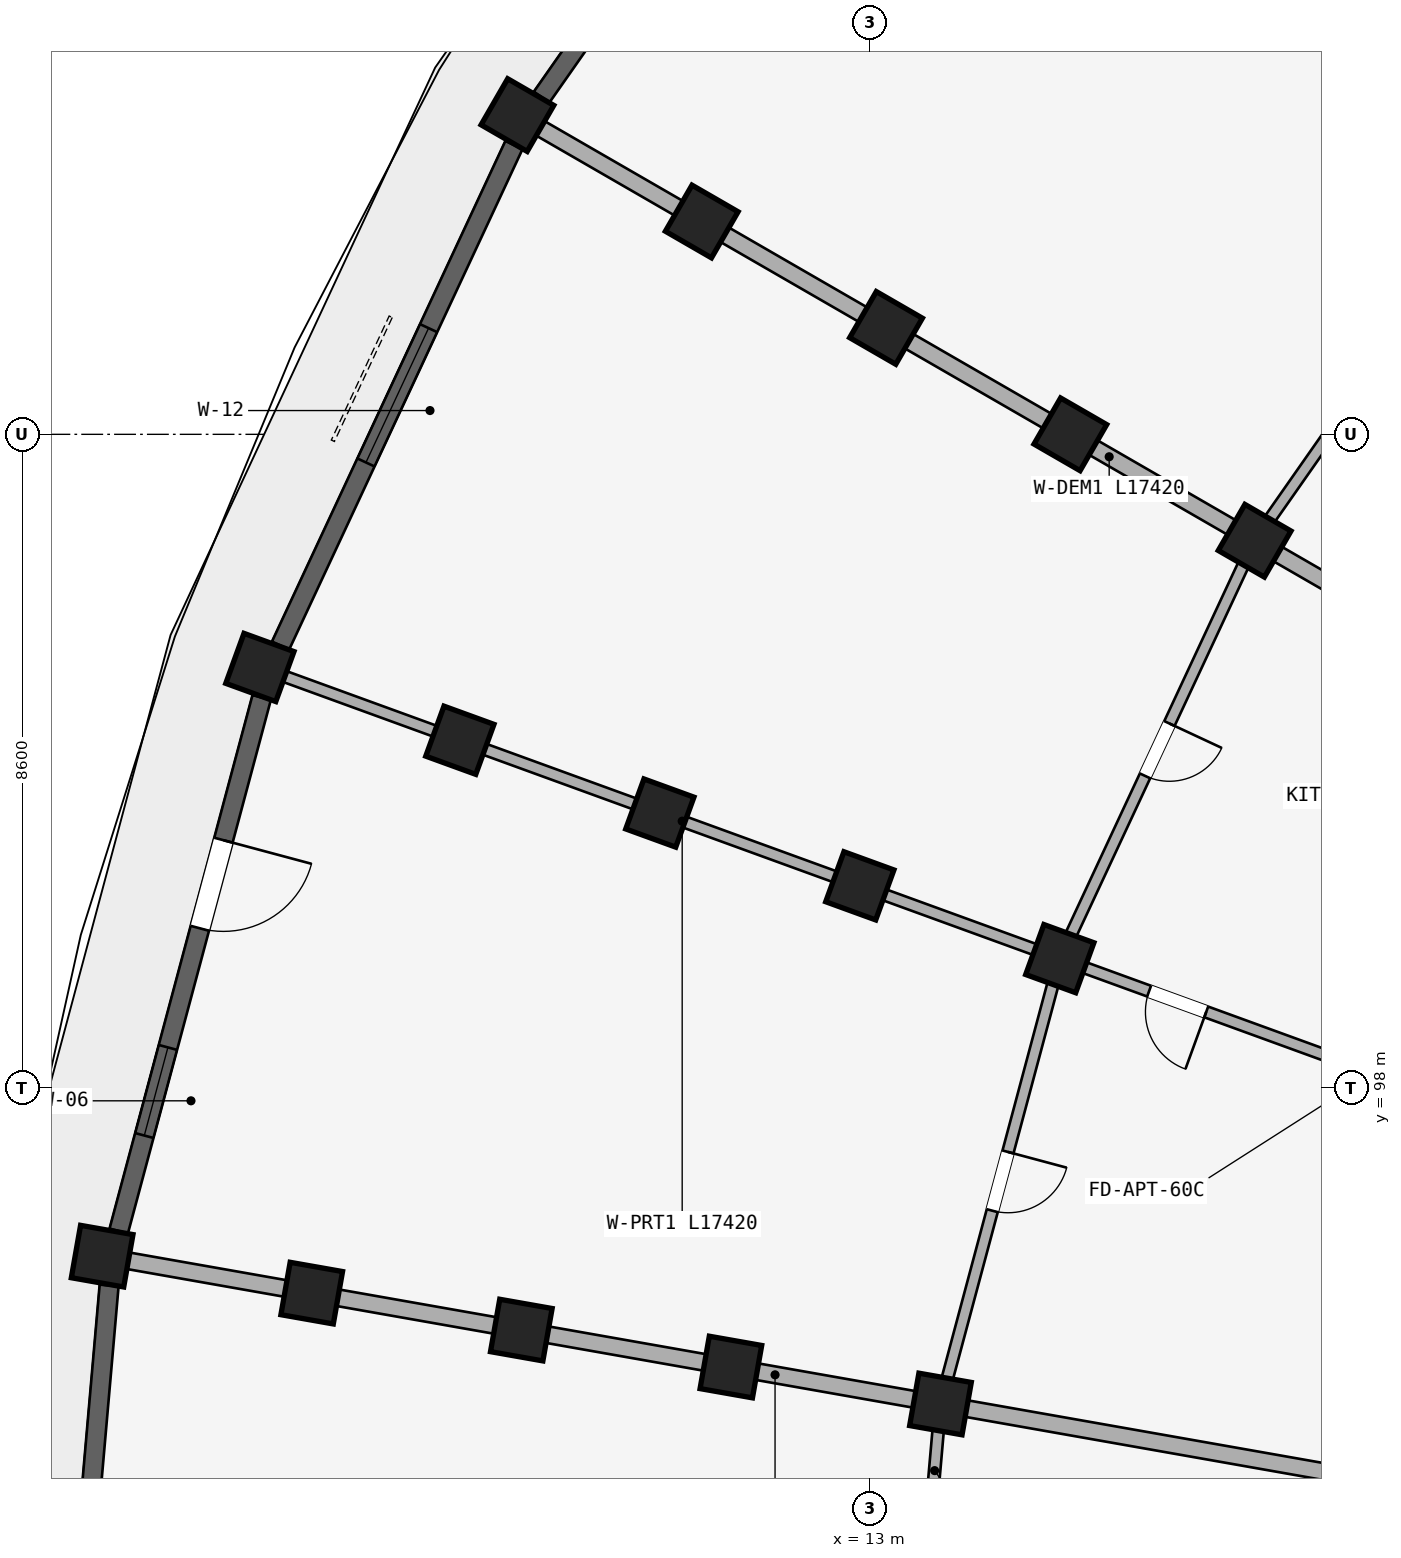
"""IFC4 building model, lengths in metres.
Left out: names, types, materials, properties, quantities, classifications, styles, units other than length and angle.
Written with IfcOpenShell. Run it as: python <this file> out.ifc"""

import sys

from ifc_helpers import new_model, si_unit, direction, frame, frame_2d, origin, origin_2d, place, context, subcontext, project, spatial, rectangle, extrude, element, fill, save


model = new_model("IFC4")
c1 = context("Model", 3, precision=1e-05, world=origin(), true_north=direction((0.0, 1.0)))
c2 = subcontext(c1, "Body", "Model", "MODEL_VIEW")
j1 = project(units=[si_unit("LENGTHUNIT", "METRE"), si_unit("PLANEANGLEUNIT", "RADIAN")], contexts=[c1])
p1 = place(None, origin())
s1 = spatial("IfcSite", under=j1, at=p1, CompositionType="ELEMENT")
p2 = place(p1, origin())
s2 = spatial("IfcBuilding", under=s1, at=p2, CompositionType="ELEMENT")
p3 = place(p2, frame((0.0, 0.0, 18.15)))
s3 = spatial("IfcBuildingStorey", under=s2, at=p3, CompositionType="ELEMENT", Elevation=18.15)
for number, where, z_axis, x_axis in (
    (1, (19.397, 111.969, 0.0), (0.0, 0.0, 1.0), (0.643, 0.766, 0.0)),
    (2, (18.062, 105.2, 0.0), (0.0, 0.0, 1.0), (0.5, 0.866, 0.0)),
    (3, (15.637, 106.6, 0.0), (0.0, 0.0, 1.0), (0.5, 0.866, 0.0)),
    (4, (13.213, 108.0, 0.0), (0.0, 0.0, 1.0), (0.5, 0.866, 0.0)),
    (5, (10.788, 109.4, 0.0), (0.0, 0.0, 1.0), (0.5, 0.866, 0.0)),
    (6, (8.363, 110.8, 0.0), (0.0, 0.0, 1.0), (0.5, 0.866, 0.0)),
    (7, (15.499, 99.702, 0.0), (0.0, 0.0, 1.0), (0.342, 0.94, 0.0)),
    (8, (12.868, 100.66, 0.0), (0.0, 0.0, 1.0), (0.342, 0.94, 0.0)),
    (9, (10.236, 101.618, 0.0), (0.0, 0.0, 1.0), (0.342, 0.94, 0.0)),
    (10, (7.605, 102.575, 0.0), (0.0, 0.0, 1.0), (0.342, 0.94, 0.0)),
    (11, (4.974, 103.533, 0.0), (0.0, 0.0, 1.0), (0.342, 0.94, 0.0)),
    (12, (13.929, 93.843, 0.0), (0.0, 0.0, 1.0), (0.174, 0.985, 0.0)),
    (13, (11.171, 94.329, 0.0), (0.0, 0.0, 1.0), (0.174, 0.985, 0.0)),
    (14, (8.414, 94.815, 0.0), (0.0, 0.0, 1.0), (0.174, 0.985, 0.0)),
    (15, (5.656, 95.302, 0.0), (0.0, 0.0, 1.0), (0.174, 0.985, 0.0)),
    (16, (2.899, 95.788, 0.0), (0.0, 0.0, 1.0), (0.174, 0.985, 0.0)),
):
    element("IfcColumn", number, at=place(p3, frame(where, z_axis=z_axis, x_axis=x_axis)), inside=s3, PredefinedType="COLUMN", context=c2, shape_type="SweptSolid", body=[
        extrude(rectangle(XDim=0.7, YDim=0.7, at=origin_2d()), origin(), (0.0, 0.0, 1.0), 2.93),
    ])
p4 = place(p3, frame((30.009, 109.479, 0.0), z_axis=(0.0, 0.0, 1.0), x_axis=(-0.642784757967, 0.766046835987, 0.0)))
e17 = element("IfcWall", 17, at=p4, inside=s3, PredefinedType="PARTITIONING", context=c2, shape_type="SweptSolid", body=[
    extrude(rectangle(XDim=17.42, YDim=0.15, at=frame_2d((8.71, 0.0))), origin(), (0.0, 0.0, 1.0), 2.372),
])
p5 = place(p4, frame((4.45, 0.0, 0.0)))
e18 = element("IfcOpeningElement", 18, at=p5, cuts=e17, PredefinedType="OPENING", context=c2, shape_type="SweptSolid", body=[
    extrude(rectangle(XDim=0.8, YDim=2.1, at=frame_2d((0.4, 1.05))), frame((0.0, 0.085, 0.0), z_axis=(0.0, -1.0, 0.0), x_axis=(1.0, 0.0, 0.0)), (0.0, 0.0, 1.0), 0.17),
])
p6 = place(p3, frame((26.521, 105.991, 0.0), z_axis=(0.0, 0.0, 1.0), x_axis=(-0.766046835987, 0.642784757967, 0.0)))
e19 = element("IfcWall", 19, at=p6, inside=s3, PredefinedType="PARTITIONING", context=c2, shape_type="SweptSolid", body=[
    extrude(rectangle(XDim=17.42, YDim=0.15, at=frame_2d((8.71, 0.0))), origin(), (0.0, 0.0, 1.0), 2.372),
])
p7 = place(p6, frame((4.45, 0.0, 0.0)))
e20 = element("IfcOpeningElement", 20, at=p7, cuts=e19, PredefinedType="OPENING", context=c2, shape_type="SweptSolid", body=[
    extrude(rectangle(XDim=0.8, YDim=2.1, at=frame_2d((0.4, 1.05))), frame((0.0, 0.085, 0.0), z_axis=(0.0, -1.0, 0.0), x_axis=(1.0, 0.0, 0.0)), (0.0, 0.0, 1.0), 0.17),
])
p8 = place(p3, frame((23.691, 101.95, 0.0), z_axis=(0.0, 0.0, 1.0), x_axis=(-0.866026648973, 0.499997843263, 0.0)))
e21 = element("IfcWall", 21, at=p8, inside=s3, PredefinedType="STANDARD", context=c2, shape_type="SweptSolid", body=[
    extrude(rectangle(XDim=17.42, YDim=0.22, at=frame_2d((8.71, 0.0))), origin(), (0.0, 0.0, 1.0), 2.372),
])
p9 = place(p3, frame((21.607, 97.479, 0.0), z_axis=(0.0, 0.0, 1.0), x_axis=(-0.939691901159, 0.342022120477, 0.0)))
e22 = element("IfcWall", 22, at=p9, inside=s3, PredefinedType="PARTITIONING", context=c2, shape_type="SweptSolid", body=[
    extrude(rectangle(XDim=17.42, YDim=0.15, at=frame_2d((8.71, 0.0))), origin(), (0.0, 0.0, 1.0), 2.372),
])
p10 = place(p9, frame((4.45, 0.0, 0.0)))
e23 = element("IfcOpeningElement", 23, at=p10, cuts=e22, PredefinedType="OPENING", context=c2, shape_type="SweptSolid", body=[
    extrude(rectangle(XDim=0.8, YDim=2.1, at=frame_2d((0.4, 1.05))), frame((0.0, 0.085, 0.0), z_axis=(0.0, -1.0, 0.0), x_axis=(1.0, 0.0, 0.0)), (0.0, 0.0, 1.0), 0.17),
])
p11 = place(p3, frame((20.33, 92.714, 0.0), z_axis=(0.0, 0.0, 1.0), x_axis=(-0.984808098809, 0.173646216546, 0.0)))
e24 = element("IfcWall", 24, at=p11, inside=s3, PredefinedType="STANDARD", context=c2, shape_type="SweptSolid", body=[
    extrude(rectangle(XDim=17.42, YDim=0.22, at=frame_2d((8.71, 0.0))), origin(), (0.0, 0.0, 1.0), 2.372),
])
p12 = place(p3, frame((21.542, 110.169, 0.0), z_axis=(0.0, 0.0, 1.0), x_axis=(-0.573594691504, -0.81913926159, 0.0)))
e25 = element("IfcWall", 25, at=p12, inside=s3, PredefinedType="PLUMBINGWALL", context=c2, shape_type="SweptSolid", body=[
    extrude(rectangle(XDim=6.066, YDim=0.15, at=frame_2d((3.033, 0.0))), origin(), (0.0, 0.0, 1.0), 2.372),
])
p13 = place(p12, frame((2.613, 0.0, 0.0)))
e26 = element("IfcOpeningElement", 26, at=p13, cuts=e25, PredefinedType="OPENING", context=c2, shape_type="SweptSolid", body=[
    extrude(rectangle(XDim=0.84, YDim=2.1, at=frame_2d((0.42, 1.05))), frame((0.0, 0.085, 0.0), z_axis=(0.0, -1.0, 0.0), x_axis=(1.0, 0.0, 0.0)), (0.0, 0.0, 1.0), 0.17),
])
p14 = place(p3, frame((18.062, 105.2, 0.0), z_axis=(0.0, 0.0, 1.0), x_axis=(-0.42260781991, -0.906312656069, 0.0)))
e27 = element("IfcWall", 27, at=p14, inside=s3, PredefinedType="PLUMBINGWALL", context=c2, shape_type="SweptSolid", body=[
    extrude(rectangle(XDim=6.066, YDim=0.15, at=frame_2d((3.033, 0.0))), origin(), (0.0, 0.0, 1.0), 2.372),
])
p15 = place(p14, frame((2.653, 0.0, 0.0)))
e28 = element("IfcOpeningElement", 28, at=p15, cuts=e27, PredefinedType="OPENING", context=c2, shape_type="SweptSolid", body=[
    extrude(rectangle(XDim=0.76, YDim=2.05, at=frame_2d((0.38, 1.025))), frame((0.0, 0.085, 0.0), z_axis=(0.0, -1.0, 0.0), x_axis=(1.0, 0.0, 0.0)), (0.0, 0.0, 1.0), 0.17),
])
p16 = place(p3, frame((15.499, 99.702, 0.0), z_axis=(0.0, 0.0, 1.0), x_axis=(-0.258827283048, -0.965923618901, 0.0)))
e29 = element("IfcWall", 29, at=p16, inside=s3, PredefinedType="PLUMBINGWALL", context=c2, shape_type="SweptSolid", body=[
    extrude(rectangle(XDim=6.066, YDim=0.15, at=frame_2d((3.033, 0.0))), origin(), (0.0, 0.0, 1.0), 2.372),
])
p17 = place(p16, frame((2.633, 0.0, 0.0)))
e30 = element("IfcOpeningElement", 30, at=p17, cuts=e29, PredefinedType="OPENING", context=c2, shape_type="SweptSolid", body=[
    extrude(rectangle(XDim=0.8, YDim=2.1, at=frame_2d((0.4, 1.05))), frame((0.0, 0.085, 0.0), z_axis=(0.0, -1.0, 0.0), x_axis=(1.0, 0.0, 0.0)), (0.0, 0.0, 1.0), 0.17),
])
p18 = place(p3, frame((13.929, 93.843, 0.0), z_axis=(0.0, 0.0, 1.0), x_axis=(-0.087174938512, -0.996193018494, 0.0)))
e31 = element("IfcWall", 31, at=p18, inside=s3, PredefinedType="PLUMBINGWALL", context=c2, shape_type="SweptSolid", body=[
    extrude(rectangle(XDim=6.066, YDim=0.15, at=frame_2d((3.033, 0.0))), origin(), (0.0, 0.0, 1.0), 2.372),
])
p19 = place(p18, frame((2.613, 0.0, 0.0)))
e32 = element("IfcOpeningElement", 32, at=p19, cuts=e31, PredefinedType="OPENING", context=c2, shape_type="SweptSolid", body=[
    extrude(rectangle(XDim=0.84, YDim=2.1, at=frame_2d((0.42, 1.05))), frame((0.0, 0.085, 0.0), z_axis=(0.0, -1.0, 0.0), x_axis=(1.0, 0.0, 0.0)), (0.0, 0.0, 1.0), 0.17),
])
p20 = place(p3, frame((12.849, 116.989, 0.0), z_axis=(0.0, 0.0, 1.0), x_axis=(-0.573566061701, -0.819159308599, 0.0)))
e33 = element("IfcWall", 33, at=p20, inside=s3, PredefinedType="STANDARD", context=c2, shape_type="SweptSolid", body=[
    extrude(rectangle(XDim=7.267, YDim=0.25, at=frame_2d((3.633, 0.0))), origin(), (0.0, 0.0, 1.0), 2.372),
])
p21 = place(p20, frame((2.583, 0.0, 0.372)))
e34 = element("IfcOpeningElement", 34, at=p21, cuts=e33, PredefinedType="OPENING", context=c2, shape_type="SweptSolid", body=[
    extrude(rectangle(XDim=2.1, YDim=1.8, at=frame_2d((1.05, 0.9))), frame((0.0, 0.135, 0.0), z_axis=(0.0, -1.0, 0.0), x_axis=(1.0, 0.0, 0.0)), (0.0, 0.0, 1.0), 0.27),
])
p22 = place(p3, frame((8.317, 110.406, 0.0), z_axis=(0.0, 0.0, 1.0), x_axis=(-0.422627946127, -0.90630327107, 0.0)))
e35 = element("IfcWall", 35, at=p22, inside=s3, PredefinedType="STANDARD", context=c2, shape_type="SweptSolid", body=[
    extrude(rectangle(XDim=7.267, YDim=0.25, at=frame_2d((3.633, 0.0))), origin(), (0.0, 0.0, 1.0), 2.372),
])
p23 = place(p22, frame((2.658, 0.0, 0.322)))
e36 = element("IfcOpeningElement", 36, at=p23, cuts=e35, PredefinedType="OPENING", context=c2, shape_type="SweptSolid", body=[
    extrude(rectangle(XDim=1.95, YDim=1.85, at=frame_2d((0.975, 0.925))), frame((0.0, 0.135, 0.0), z_axis=(0.0, -1.0, 0.0), x_axis=(1.0, 0.0, 0.0)), (0.0, 0.0, 1.0), 0.27),
])
p24 = place(p3, frame((4.998, 103.137, 0.0), z_axis=(0.0, 0.0, 1.0), x_axis=(-0.258802140196, -0.965930355787, 0.0)))
e37 = element("IfcWall", 37, at=p24, inside=s3, PredefinedType="STANDARD", context=c2, shape_type="SweptSolid", body=[
    extrude(rectangle(XDim=7.267, YDim=0.25, at=frame_2d((3.633, 0.0))), origin(), (0.0, 0.0, 1.0), 2.372),
])
p25 = place(p24, frame((4.766, 0.0, 0.522)))
e38 = element("IfcOpeningElement", 38, at=p25, cuts=e37, PredefinedType="OPENING", context=c2, shape_type="SweptSolid", body=[
    extrude(rectangle(XDim=1.2, YDim=1.5, at=frame_2d((0.6, 0.75))), frame((0.0, 0.135, 0.0), z_axis=(0.0, -1.0, 0.0), x_axis=(1.0, 0.0, 0.0)), (0.0, 0.0, 1.0), 0.27),
])
p26 = place(p24, frame((1.943, 0.0, 0.0)))
e39 = element("IfcOpeningElement", 39, at=p26, cuts=e37, PredefinedType="OPENING", context=c2, shape_type="SweptSolid", body=[
    extrude(rectangle(XDim=1.2, YDim=2.15, at=frame_2d((0.6, 1.075))), frame((0.0, 0.135, 0.0), z_axis=(0.0, -1.0, 0.0), x_axis=(1.0, 0.0, 0.0)), (0.0, 0.0, 1.0), 0.27),
])
p27 = place(p3, frame((2.991, 95.403, 0.0), z_axis=(0.0, 0.0, 1.0), x_axis=(-0.08718487158, -0.99619214922, 0.0)))
e40 = element("IfcWall", 40, at=p27, inside=s3, PredefinedType="STANDARD", context=c2, shape_type="SweptSolid", body=[
    extrude(rectangle(XDim=7.267, YDim=0.25, at=frame_2d((3.633, 0.0))), origin(), (0.0, 0.0, 1.0), 2.372),
])
p28 = place(p27, frame((2.808, 0.0, 0.422)))
e41 = element("IfcOpeningElement", 41, at=p28, cuts=e40, PredefinedType="OPENING", context=c2, shape_type="SweptSolid", body=[
    extrude(rectangle(XDim=1.65, YDim=1.75, at=frame_2d((0.825, 0.875))), frame((0.0, 0.135, 0.0), z_axis=(0.0, -1.0, 0.0), x_axis=(1.0, 0.0, 0.0)), (0.0, 0.0, 1.0), 0.27),
])
p29 = place(p23, origin())
e42 = element("IfcWindow", 42, at=p29, inside=s3, PartitioningType="DOUBLE_PANEL_VERTICAL", PredefinedType="WINDOW", context=c2, shape_type="SweptSolid", body=[
    extrude(rectangle(XDim=1.95, YDim=1.85, at=frame_2d((0.975, 0.925))), frame((0.0, 0.03, 0.0), z_axis=(0.0, -1.0, 0.0), x_axis=(1.0, 0.0, 0.0)), (0.0, 0.0, 1.0), 0.06),
])
fill(e36, e42)
p30 = place(p25, origin())
e43 = element("IfcWindow", 43, at=p30, inside=s3, PartitioningType="SINGLE_PANEL", PredefinedType="WINDOW", context=c2, shape_type="SweptSolid", body=[
    extrude(rectangle(XDim=1.2, YDim=1.5, at=frame_2d((0.6, 0.75))), frame((0.0, 0.03, 0.0), z_axis=(0.0, -1.0, 0.0), x_axis=(1.0, 0.0, 0.0)), (0.0, 0.0, 1.0), 0.06),
])
fill(e38, e43)
p31 = place(p10, frame((0.8, 0.0, 0.0), z_axis=(0.0, 0.0, 1.0), x_axis=(-1.0, 0.0, 0.0)))
e44 = element("IfcDoor", 44, at=p31, inside=s3, OperationType="SINGLE_SWING_RIGHT", PredefinedType="DOOR", context=c2, shape_type="SweptSolid", body=[
    extrude(rectangle(XDim=0.8, YDim=2.1, at=frame_2d((0.4, 1.05))), frame((0.0, 0.025, 0.0), z_axis=(0.0, -1.0, 0.0), x_axis=(1.0, 0.0, 0.0)), (0.0, 0.0, 1.0), 0.05),
])
fill(e23, e44)
p32 = place(p15, frame((0.76, 0.0, 0.0), z_axis=(0.0, 0.0, 1.0), x_axis=(-1.0, 0.0, 0.0)))
e45 = element("IfcDoor", 45, at=p32, inside=s3, OperationType="SINGLE_SWING_RIGHT", PredefinedType="DOOR", context=c2, shape_type="SweptSolid", body=[
    extrude(rectangle(XDim=0.76, YDim=2.05, at=frame_2d((0.38, 1.025))), frame((0.0, 0.025, 0.0), z_axis=(0.0, -1.0, 0.0), x_axis=(1.0, 0.0, 0.0)), (0.0, 0.0, 1.0), 0.05),
])
fill(e28, e45)
p33 = place(p17, origin())
e46 = element("IfcDoor", 46, at=p33, inside=s3, OperationType="SINGLE_SWING_LEFT", PredefinedType="DOOR", context=c2, shape_type="SweptSolid", body=[
    extrude(rectangle(XDim=0.8, YDim=2.1, at=frame_2d((0.4, 1.05))), frame((0.0, 0.025, 0.0), z_axis=(0.0, -1.0, 0.0), x_axis=(1.0, 0.0, 0.0)), (0.0, 0.0, 1.0), 0.05),
])
fill(e30, e46)
p34 = place(p26, frame((1.2, 0.0, 0.0), z_axis=(0.0, 0.0, 1.0), x_axis=(-1.0, 0.0, 0.0)))
e47 = element("IfcDoor", 47, at=p34, inside=s3, OperationType="SINGLE_SWING_RIGHT", PredefinedType="DOOR", context=c2, shape_type="SweptSolid", body=[
    extrude(rectangle(XDim=1.2, YDim=2.15, at=frame_2d((0.6, 1.075))), frame((0.0, 0.025, 0.0), z_axis=(0.0, -1.0, 0.0), x_axis=(1.0, 0.0, 0.0)), (0.0, 0.0, 1.0), 0.05),
])
fill(e39, e47)
save(model, sys.argv[1])
